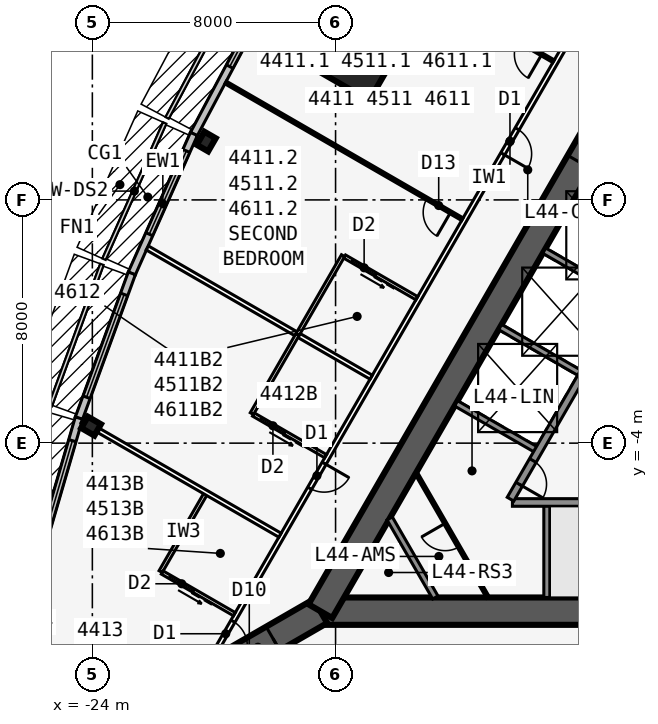
"""IFC4 building model, lengths in metres.
Left out: names, types, materials, properties, quantities, classifications, styles, units other than length and angle.
Written with IfcOpenShell. Run it as: python <this file> out.ifc"""

import sys

from ifc_helpers import new_model, si_unit, direction, frame, frame_2d, origin, origin_2d, place, context, subcontext, project, spatial, rectangle, i_section, extrude, element, fill, save


model = new_model("IFC4")
c1 = context("Model", 3, precision=1e-05, world=origin(), true_north=direction((0.0, 1.0)))
c2 = subcontext(c1, "Body", "Model", "MODEL_VIEW")
j1 = project(units=[si_unit("LENGTHUNIT", "METRE"), si_unit("PLANEANGLEUNIT", "RADIAN")], contexts=[c1])
p1 = place(None, origin())
s1 = spatial("IfcSite", under=j1, at=p1, CompositionType="ELEMENT")
p2 = place(p1, origin())
s2 = spatial("IfcBuilding", under=s1, at=p2, CompositionType="ELEMENT")
p3 = place(p2, frame((0.0, 0.0, 165.7)))
s3 = spatial("IfcBuildingStorey", under=s2, at=p3, CompositionType="ELEMENT", Elevation=165.7)
p4 = place(p3, frame((-16.5, -9.526, 0.0), z_axis=(0.0, 0.0, 1.0), x_axis=(1.0, 0.0, 0.0)))
e1 = element("IfcWall", 1, at=p4, inside=s3, PredefinedType="SHEAR", context=c2, shape_type="SweptSolid", body=[
    extrude(rectangle(XDim=33.0, YDim=0.9, at=frame_2d((16.5, 0.0))), origin(), (0.0, 0.0, 1.0), 3.4),
])
p5 = place(p4, frame((14.05, 0.0, 0.0)))
e2 = element("IfcOpeningElement", 2, at=p5, cuts=e1, PredefinedType="OPENING", context=c2, shape_type="SweptSolid", body=[
    extrude(rectangle(XDim=1.8, YDim=2.13, at=frame_2d((0.9, 1.065))), frame((0.0, 0.46, 0.0), z_axis=(0.0, -1.0, 0.0), x_axis=(1.0, 0.0, 0.0)), (0.0, 0.0, 1.0), 0.92),
])
p6 = place(p3, frame((-10.183, -5.951, 0.0), z_axis=(0.0, 0.0, 1.0), x_axis=(1.0, 0.0, 0.0)))
e3 = element("IfcWall", 3, at=p6, inside=s3, PredefinedType="SOLIDWALL", context=c2, shape_type="SweptSolid", body=[
    extrude(rectangle(XDim=7.633, YDim=0.25, at=frame_2d((3.816, 0.0))), origin(), (0.0, 0.0, 1.0), 3.235),
])
p7 = place(p3, frame((-9.05, -5.951, 0.0), z_axis=(0.0, 0.0, 1.0), x_axis=(0.0, -1.0, 0.0)))
e4 = element("IfcWall", 4, at=p7, inside=s3, PredefinedType="SOLIDWALL", context=c2, shape_type="SweptSolid", body=[
    extrude(rectangle(XDim=3.125, YDim=0.2, at=frame_2d((1.562, 0.0))), origin(), (0.0, 0.0, 1.0), 3.235),
])
p8 = place(p3, frame((0.0, 19.052, 0.0), z_axis=(0.0, 0.0, 1.0), x_axis=(-0.499999749417, -0.866025548458, 0.0)))
e5 = element("IfcWall", 5, at=p8, inside=s3, PredefinedType="SHEAR", context=c2, shape_type="SweptSolid", body=[
    extrude(rectangle(XDim=33.0, YDim=0.9, at=frame_2d((16.5, 0.0))), origin(), (0.0, 0.0, 1.0), 3.4),
])
p9 = place(p8, frame((14.15, 0.0, 0.0)))
e6 = element("IfcOpeningElement", 6, at=p9, cuts=e5, PredefinedType="OPENING", context=c2, shape_type="SweptSolid", body=[
    extrude(rectangle(XDim=1.8, YDim=2.13, at=frame_2d((0.9, 1.065))), frame((0.0, 0.46, 0.0), z_axis=(0.0, -1.0, 0.0), x_axis=(1.0, 0.0, 0.0)), (0.0, 0.0, 1.0), 0.92),
])
p10 = place(p8, frame((12.6, 0.0, 0.0)))
e7 = element("IfcOpeningElement", 7, at=p10, cuts=e5, PredefinedType="OPENING", context=c2, shape_type="SweptSolid", body=[
    extrude(rectangle(XDim=1.0, YDim=2.13, at=frame_2d((0.5, 1.065))), frame((0.0, 0.46, 0.0), z_axis=(0.0, -1.0, 0.0), x_axis=(1.0, 0.0, 0.0)), (0.0, 0.0, 1.0), 0.92),
])
p11 = place(p3, frame((-4.929, 3.365, 0.0), z_axis=(0.0, 0.0, 1.0), x_axis=(-0.499991433582, -0.866030349552, 0.0)))
e8 = element("IfcWall", 8, at=p11, inside=s3, PredefinedType="SOLIDWALL", context=c2, shape_type="SweptSolid", body=[
    extrude(rectangle(XDim=10.633, YDim=0.25, at=frame_2d((5.316, 0.0))), origin(), (0.0, 0.0, 1.0), 3.235),
])
p12 = place(p11, frame((9.164, 0.0, 0.0)))
e9 = element("IfcOpeningElement", 9, at=p12, cuts=e8, PredefinedType="OPENING", context=c2, shape_type="SweptSolid", body=[
    extrude(rectangle(XDim=0.9, YDim=2.13, at=frame_2d((0.45, 1.065))), frame((0.0, 0.135, 0.0), z_axis=(0.0, -1.0, 0.0), x_axis=(1.0, 0.0, 0.0)), (0.0, 0.0, 1.0), 0.27),
])
for number, where, z_axis, x_axis in (
    (10, (-6.429, 0.767, 0.0), (0.0, 0.0, 1.0), (-0.866, 0.5, 0.0)),
    (11, (-7.879, -1.744, 0.0), (0.0, 0.0, 1.0), (-0.866, 0.5, 0.0)),
    (12, (-9.329, -4.256, 0.0), (0.0, 0.0, 1.0), (-0.866, 0.5, 0.0)),
):
    element("IfcWall", number, at=place(p3, frame(where, z_axis=z_axis, x_axis=x_axis)), inside=s3, PredefinedType="SOLIDWALL", context=c2, shape_type="SweptSolid", body=[
        extrude(rectangle(XDim=3.125, YDim=0.2, at=frame_2d((1.562, 0.0))), origin(), (0.0, 0.0, 1.0), 3.235),
    ])
p13 = place(p3, frame((-16.5, -9.526, 0.0), z_axis=(0.0, 0.0, 1.0), x_axis=(-0.866031398331, -0.499989616998, 0.0)))
e13 = element("IfcWall", 13, at=p13, inside=s3, PredefinedType="SHEAR", context=c2, shape_type="SweptSolid", body=[
    extrude(rectangle(XDim=4.746, YDim=0.9, at=frame_2d((2.373, 0.0))), origin(), (0.0, 0.0, 1.0), 3.4),
])
p14 = place(p13, frame((1.8, 0.0, 0.0)))
e14 = element("IfcOpeningElement", 14, at=p14, cuts=e13, PredefinedType="OPENING", context=c2, shape_type="SweptSolid", body=[
    extrude(rectangle(XDim=1.8, YDim=2.13, at=frame_2d((0.9, 1.065))), frame((0.0, 0.46, 0.0), z_axis=(0.0, -1.0, 0.0), x_axis=(1.0, 0.0, 0.0)), (0.0, 0.0, 1.0), 0.92),
])
for number, where, z_axis, x_axis in (
    (15, (-20.254, 5.92, 0.0), (0.0, 0.0, 1.0), (-0.866, 0.5, 0.0)),
    (16, (-24.041, -3.44, 0.0), (0.0, 0.0, 1.0), (-0.5, -0.866, 0.0)),
):
    element("IfcColumn", number, at=place(p3, frame(where, z_axis=z_axis, x_axis=x_axis)), inside=s3, PredefinedType="COLUMN", context=c2, shape_type="SweptSolid", body=[
        extrude(i_section(OverallWidth=0.432, OverallDepth=0.498, WebThickness=0.056, FlangeThickness=0.089, at=origin_2d()), origin(), (0.0, 0.0, 1.0), 3.4),
    ])
p15 = place(p3, frame((-15.312, 8.84, 0.0), z_axis=(0.0, 0.0, 1.0), x_axis=(-0.866025403784, 0.5, 0.0)))
e17 = element("IfcColumn", 17, at=p15, inside=s3, PredefinedType="COLUMN", context=c2, shape_type="SweptSolid", body=[
    extrude(rectangle(XDim=2.3, YDim=2.3, at=origin_2d()), origin(), (0.0, 0.0, 1.0), 3.4),
])
p16 = place(p3, frame((-18.314, 10.579, 0.0), z_axis=(0.0, 0.0, 1.0), x_axis=(-0.469404966864, -0.882982999317, 0.0)))
e18 = element("IfcWall", 18, at=p16, inside=s3, PredefinedType="STANDARD", context=c2, shape_type="SweptSolid", body=[
    extrude(rectangle(XDim=5.003, YDim=0.25, at=frame_2d((2.501, 0.0))), origin(), (0.0, 0.0, 1.0), 3.235),
])
p17 = place(p16, frame((0.684, 0.0, 0.45)))
e19 = element("IfcOpeningElement", 19, at=p17, cuts=e18, PredefinedType="OPENING", context=c2, shape_type="SweptSolid", body=[
    extrude(rectangle(XDim=1.8, YDim=2.4, at=frame_2d((0.9, 1.2))), frame((0.0, 0.135, 0.0), z_axis=(0.0, -1.0, 0.0), x_axis=(1.0, 0.0, 0.0)), (0.0, 0.0, 1.0), 0.27),
])
p18 = place(p3, frame((-20.659, 6.169, 0.0), z_axis=(0.0, 0.0, 1.0), x_axis=(-0.406832200364, -0.913502906808, 0.0)))
e20 = element("IfcWall", 20, at=p18, inside=s3, PredefinedType="STANDARD", context=c2, shape_type="SweptSolid", body=[
    extrude(rectangle(XDim=5.028, YDim=0.25, at=frame_2d((2.514, 0.0))), origin(), (0.0, 0.0, 1.0), 3.235),
])
p19 = place(p18, frame((0.61, 0.0, 0.45)))
e21 = element("IfcOpeningElement", 21, at=p19, cuts=e20, PredefinedType="OPENING", context=c2, shape_type="SweptSolid", body=[
    extrude(rectangle(XDim=3.0, YDim=2.4, at=frame_2d((1.5, 1.2))), frame((0.0, 0.135, 0.0), z_axis=(0.0, -1.0, 0.0), x_axis=(1.0, 0.0, 0.0)), (0.0, 0.0, 1.0), 0.27),
])
p20 = place(p3, frame((-22.701, 1.584, 0.0), z_axis=(0.0, 0.0, 1.0), x_axis=(-0.343225593282, -0.939252996863, 0.0)))
e22 = element("IfcWall", 22, at=p20, inside=s3, PredefinedType="STANDARD", context=c2, shape_type="SweptSolid", body=[
    extrude(rectangle(XDim=5.076, YDim=0.25, at=frame_2d((2.538, 0.0))), origin(), (0.0, 0.0, 1.0), 3.235),
])
p21 = place(p20, frame((0.738, 0.0, 0.45)))
e23 = element("IfcOpeningElement", 23, at=p21, cuts=e22, PredefinedType="OPENING", context=c2, shape_type="SweptSolid", body=[
    extrude(rectangle(XDim=3.6, YDim=2.4, at=frame_2d((1.8, 1.2))), frame((0.0, 0.135, 0.0), z_axis=(0.0, -1.0, 0.0), x_axis=(1.0, 0.0, 0.0)), (0.0, 0.0, 1.0), 0.27),
])
p22 = place(p3, frame((-24.441, -3.175, 0.0), z_axis=(0.0, 0.0, 1.0), x_axis=(-0.279528287117, -0.960137457191, 0.0)))
e24 = element("IfcWall", 24, at=p22, inside=s3, PredefinedType="STANDARD", context=c2, shape_type="SweptSolid", body=[
    extrude(rectangle(XDim=5.148, YDim=0.25, at=frame_2d((2.574, 0.0))), origin(), (0.0, 0.0, 1.0), 3.235),
])
p23 = place(p22, frame((0.774, 0.0, 0.45)))
e25 = element("IfcOpeningElement", 25, at=p23, cuts=e24, PredefinedType="OPENING", context=c2, shape_type="SweptSolid", body=[
    extrude(rectangle(XDim=3.6, YDim=2.4, at=frame_2d((1.8, 1.2))), frame((0.0, 0.135, 0.0), z_axis=(0.0, -1.0, 0.0), x_axis=(1.0, 0.0, 0.0)), (0.0, 0.0, 1.0), 0.27),
])
p24 = place(p3, frame((-0.5, 22.836, 0.0), z_axis=(0.0, 0.0, 1.0), x_axis=(-0.500001677587, -0.866024435227, 0.0)))
e26 = element("IfcWall", 26, at=p24, inside=s3, PredefinedType="PARTITIONING", context=c2, shape_type="SweptSolid", body=[
    extrude(rectangle(XDim=39.054, YDim=0.15, at=frame_2d((19.527, 0.0))), origin(), (0.0, 0.0, 1.0), 3.235),
])
p25 = place(p24, frame((1.558, 0.0, 0.0)))
e27 = element("IfcOpeningElement", 27, at=p25, cuts=e26, PredefinedType="OPENING", context=c2, shape_type="SweptSolid", body=[
    extrude(rectangle(XDim=0.95, YDim=2.13, at=frame_2d((0.475, 1.065))), frame((0.0, 0.085, 0.0), z_axis=(0.0, -1.0, 0.0), x_axis=(1.0, 0.0, 0.0)), (0.0, 0.0, 1.0), 0.17),
])
p26 = place(p24, frame((19.052, 0.0, 0.0)))
e28 = element("IfcOpeningElement", 28, at=p26, cuts=e26, PredefinedType="OPENING", context=c2, shape_type="SweptSolid", body=[
    extrude(rectangle(XDim=0.95, YDim=2.13, at=frame_2d((0.475, 1.065))), frame((0.0, 0.085, 0.0), z_axis=(0.0, -1.0, 0.0), x_axis=(1.0, 0.0, 0.0)), (0.0, 0.0, 1.0), 0.17),
])
p27 = place(p24, frame((31.752, 0.0, 0.0)))
e29 = element("IfcOpeningElement", 29, at=p27, cuts=e26, PredefinedType="OPENING", context=c2, shape_type="SweptSolid", body=[
    extrude(rectangle(XDim=0.95, YDim=2.13, at=frame_2d((0.475, 1.065))), frame((0.0, 0.085, 0.0), z_axis=(0.0, -1.0, 0.0), x_axis=(1.0, 0.0, 0.0)), (0.0, 0.0, 1.0), 0.17),
])
p28 = place(p24, frame((37.752, 0.0, 0.0)))
e30 = element("IfcOpeningElement", 30, at=p28, cuts=e26, PredefinedType="OPENING", context=c2, shape_type="SweptSolid", body=[
    extrude(rectangle(XDim=0.95, YDim=2.13, at=frame_2d((0.475, 1.065))), frame((0.0, 0.085, 0.0), z_axis=(0.0, -1.0, 0.0), x_axis=(1.0, 0.0, 0.0)), (0.0, 0.0, 1.0), 0.17),
])
p29 = place(p3, frame((-8.829, 8.561, 0.0), z_axis=(0.0, 0.0, 1.0), x_axis=(-0.866021034389, 0.500007567939, 0.0)))
e31 = element("IfcWall", 31, at=p29, inside=s3, PredefinedType="PARTITIONING", context=c2, shape_type="SweptSolid", body=[
    extrude(rectangle(XDim=8.993, YDim=0.1, at=frame_2d((4.497, 0.0))), origin(), (0.0, 0.0, 1.0), 3.235),
])
p30 = place(p29, frame((0.45, 0.0, 0.0)))
e32 = element("IfcOpeningElement", 32, at=p30, cuts=e31, PredefinedType="OPENING", context=c2, shape_type="SweptSolid", body=[
    extrude(rectangle(XDim=0.9, YDim=2.13, at=frame_2d((0.45, 1.065))), frame((0.0, 0.06, 0.0), z_axis=(0.0, -1.0, 0.0), x_axis=(1.0, 0.0, 0.0)), (0.0, 0.0, 1.0), 0.12),
])
p31 = place(p3, frame((-11.829, 3.365, 0.0), z_axis=(0.0, 0.0, 1.0), x_axis=(-0.866009279501, 0.500027927039, 0.0)))
e33 = element("IfcWall", 33, at=p31, inside=s3, PredefinedType="PARTITIONING", context=c2, shape_type="SweptSolid", body=[
    extrude(rectangle(XDim=8.994, YDim=0.1, at=frame_2d((4.497, 0.0))), origin(), (0.0, 0.0, 1.0), 3.235),
])
p32 = place(p31, frame((0.45, 0.0, 0.0)))
e34 = element("IfcOpeningElement", 34, at=p32, cuts=e33, PredefinedType="OPENING", context=c2, shape_type="SweptSolid", body=[
    extrude(rectangle(XDim=0.9, YDim=2.13, at=frame_2d((0.45, 1.065))), frame((0.0, 0.06, 0.0), z_axis=(0.0, -1.0, 0.0), x_axis=(1.0, 0.0, 0.0)), (0.0, 0.0, 1.0), 0.12),
])
p33 = place(p3, frame((-14.829, -1.831, 0.0), z_axis=(0.0, 0.0, 1.0), x_axis=(-0.866023962952, 0.500002495586, 0.0)))
e35 = element("IfcWall", 35, at=p33, inside=s3, PredefinedType="PARTITIONING", context=c2, shape_type="SweptSolid", body=[
    extrude(rectangle(XDim=8.502, YDim=0.15, at=frame_2d((4.251, 0.0))), origin(), (0.0, 0.0, 1.0), 3.235),
])
p34 = place(p3, frame((-17.829, -7.027, 0.0), z_axis=(0.0, 0.0, 1.0), x_axis=(-0.866029804378, 0.499992377871, 0.0)))
e36 = element("IfcWall", 36, at=p34, inside=s3, PredefinedType="PARTITIONING", context=c2, shape_type="SweptSolid", body=[
    extrude(rectangle(XDim=7.516, YDim=0.15, at=frame_2d((3.758, 0.0))), origin(), (0.0, 0.0, 1.0), 2.389),
])
p35 = place(p3, frame((-15.753, 2.167, 0.0), z_axis=(0.0, 0.0, 1.0), x_axis=(-0.499990139034, -0.866031096941, 0.0)))
e37 = element("IfcWall", 37, at=p35, inside=s3, PredefinedType="PLUMBINGWALL", context=c2, shape_type="SweptSolid", body=[
    extrude(rectangle(XDim=3.0, YDim=0.12, at=frame_2d((1.5, 0.0))), origin(), (0.0, 0.0, 1.0), 3.235),
])
p36 = place(p3, frame((-13.329, 0.767, 0.0), z_axis=(0.0, 0.0, 1.0), x_axis=(-0.866035715982, 0.499982138324, 0.0)))
e38 = element("IfcWall", 38, at=p36, inside=s3, PredefinedType="PLUMBINGWALL", context=c2, shape_type="SweptSolid", body=[
    extrude(rectangle(XDim=2.74, YDim=0.12, at=frame_2d((1.37, 0.0))), origin(), (0.0, 0.0, 1.0), 3.235),
])
p37 = place(p36, frame((1.55, 0.0, 0.0)))
e39 = element("IfcOpeningElement", 39, at=p37, cuts=e38, PredefinedType="OPENING", context=c2, shape_type="SweptSolid", body=[
    extrude(rectangle(XDim=0.9, YDim=2.13, at=frame_2d((0.45, 1.065))), frame((0.0, 0.07, 0.0), z_axis=(0.0, -1.0, 0.0), x_axis=(1.0, 0.0, 0.0)), (0.0, 0.0, 1.0), 0.14),
])
p38 = place(p3, frame((-17.253, -0.431, 0.0), z_axis=(0.0, 0.0, 1.0), x_axis=(-0.499990139034, -0.866031096941, 0.0)))
e40 = element("IfcWall", 40, at=p38, inside=s3, PredefinedType="PLUMBINGWALL", context=c2, shape_type="SweptSolid", body=[
    extrude(rectangle(XDim=3.0, YDim=0.12, at=frame_2d((1.5, 0.0))), origin(), (0.0, 0.0, 1.0), 3.235),
])
p39 = place(p3, frame((-16.329, -4.429, 0.0), z_axis=(0.0, 0.0, 1.0), x_axis=(-0.865997131366, 0.500048966069, 0.0)))
e41 = element("IfcWall", 41, at=p39, inside=s3, PredefinedType="PLUMBINGWALL", context=c2, shape_type="SweptSolid", body=[
    extrude(rectangle(XDim=2.74, YDim=0.12, at=frame_2d((1.37, 0.0))), origin(), (0.0, 0.0, 1.0), 3.235),
])
p40 = place(p39, frame((1.55, 0.0, 0.0)))
e42 = element("IfcOpeningElement", 42, at=p40, cuts=e41, PredefinedType="OPENING", context=c2, shape_type="SweptSolid", body=[
    extrude(rectangle(XDim=0.9, YDim=2.13, at=frame_2d((0.45, 1.065))), frame((0.0, 0.07, 0.0), z_axis=(0.0, -1.0, 0.0), x_axis=(1.0, 0.0, 0.0)), (0.0, 0.0, 1.0), 0.14),
])
p41 = place(p3, frame((-20.253, -5.627, 0.0), z_axis=(0.0, 0.0, 1.0), x_axis=(-0.499990139034, -0.866031096941, 0.0)))
e43 = element("IfcWall", 43, at=p41, inside=s3, PredefinedType="PLUMBINGWALL", context=c2, shape_type="SweptSolid", body=[
    extrude(rectangle(XDim=3.0, YDim=0.12, at=frame_2d((1.5, 0.0))), origin(), (0.0, 0.0, 1.0), 3.235),
])
p42 = place(p3, frame((-19.329, -9.625, 0.0), z_axis=(0.0, 0.0, 1.0), x_axis=(-0.866035715982, 0.499982138324, 0.0)))
e44 = element("IfcWall", 44, at=p42, inside=s3, PredefinedType="PLUMBINGWALL", context=c2, shape_type="SweptSolid", body=[
    extrude(rectangle(XDim=2.74, YDim=0.12, at=frame_2d((1.37, 0.0))), origin(), (0.0, 0.0, 1.0), 3.235),
])
p43 = place(p42, frame((1.55, 0.0, 0.0)))
e45 = element("IfcOpeningElement", 45, at=p43, cuts=e44, PredefinedType="OPENING", context=c2, shape_type="SweptSolid", body=[
    extrude(rectangle(XDim=0.9, YDim=2.13, at=frame_2d((0.45, 1.065))), frame((0.0, 0.07, 0.0), z_axis=(0.0, -1.0, 0.0), x_axis=(1.0, 0.0, 0.0)), (0.0, 0.0, 1.0), 0.14),
])
p44 = place(p3, frame((-12.719, -9.076, 0.0), z_axis=(0.0, 0.0, 1.0), x_axis=(-0.499952404951, 0.866052881055, 0.0)))
e46 = element("IfcWall", 46, at=p44, inside=s3, PredefinedType="SOLIDWALL", context=c2, shape_type="SweptSolid", body=[
    extrude(rectangle(XDim=3.002, YDim=0.2, at=frame_2d((1.501, 0.0))), origin(), (0.0, 0.0, 1.0), 3.235),
])
p45 = place(p3, frame((-10.986, -9.076, 0.0), z_axis=(0.0, 0.0, 1.0), x_axis=(-0.499999210213, 0.866025859768, 0.0)))
e47 = element("IfcWall", 47, at=p45, inside=s3, PredefinedType="PARTITIONING", context=c2, shape_type="SweptSolid", body=[
    extrude(rectangle(XDim=4.734, YDim=0.1, at=frame_2d((2.367, 0.0))), origin(), (0.0, 0.0, 1.0), 3.235),
])
p46 = place(p45, frame((1.917, 0.0, 0.0)))
e48 = element("IfcOpeningElement", 48, at=p46, cuts=e47, PredefinedType="OPENING", context=c2, shape_type="SweptSolid", body=[
    extrude(rectangle(XDim=0.9, YDim=2.13, at=frame_2d((0.45, 1.065))), frame((0.0, 0.06, 0.0), z_axis=(0.0, -1.0, 0.0), x_axis=(1.0, 0.0, 0.0)), (0.0, 0.0, 1.0), 0.12),
])
p47 = place(p17, origin())
e49 = element("IfcWindow", 49, at=p47, inside=s3, PartitioningType="SINGLE_PANEL", PredefinedType="WINDOW", context=c2, shape_type="SweptSolid", body=[
    extrude(rectangle(XDim=1.8, YDim=2.4, at=frame_2d((0.9, 1.2))), frame((0.0, 0.03, 0.0), z_axis=(0.0, -1.0, 0.0), x_axis=(1.0, 0.0, 0.0)), (0.0, 0.0, 1.0), 0.06),
])
fill(e19, e49)
p48 = place(p19, origin())
e50 = element("IfcWindow", 50, at=p48, inside=s3, PartitioningType="SINGLE_PANEL", PredefinedType="WINDOW", context=c2, shape_type="SweptSolid", body=[
    extrude(rectangle(XDim=3.0, YDim=2.4, at=frame_2d((1.5, 1.2))), frame((0.0, 0.03, 0.0), z_axis=(0.0, -1.0, 0.0), x_axis=(1.0, 0.0, 0.0)), (0.0, 0.0, 1.0), 0.06),
])
fill(e21, e50)
p49 = place(p21, origin())
e51 = element("IfcWindow", 51, at=p49, inside=s3, PartitioningType="SINGLE_PANEL", PredefinedType="WINDOW", context=c2, shape_type="SweptSolid", body=[
    extrude(rectangle(XDim=3.6, YDim=2.4, at=frame_2d((1.8, 1.2))), frame((0.0, 0.03, 0.0), z_axis=(0.0, -1.0, 0.0), x_axis=(1.0, 0.0, 0.0)), (0.0, 0.0, 1.0), 0.06),
])
fill(e23, e51)
p50 = place(p23, origin())
e52 = element("IfcWindow", 52, at=p50, inside=s3, PartitioningType="SINGLE_PANEL", PredefinedType="WINDOW", context=c2, shape_type="SweptSolid", body=[
    extrude(rectangle(XDim=3.6, YDim=2.4, at=frame_2d((1.8, 1.2))), frame((0.0, 0.03, 0.0), z_axis=(0.0, -1.0, 0.0), x_axis=(1.0, 0.0, 0.0)), (0.0, 0.0, 1.0), 0.06),
])
fill(e25, e52)
p51 = place(p30, origin())
e53 = element("IfcDoor", 53, at=p51, inside=s3, OperationType="SINGLE_SWING_LEFT", PredefinedType="DOOR", context=c2, shape_type="SweptSolid", body=[
    extrude(rectangle(XDim=0.9, YDim=2.13, at=frame_2d((0.45, 1.065))), frame((0.0, 0.025, 0.0), z_axis=(0.0, -1.0, 0.0), x_axis=(1.0, 0.0, 0.0)), (0.0, 0.0, 1.0), 0.05),
])
fill(e32, e53)
p52 = place(p32, origin())
e54 = element("IfcDoor", 54, at=p52, inside=s3, OperationType="SINGLE_SWING_LEFT", PredefinedType="DOOR", context=c2, shape_type="SweptSolid", body=[
    extrude(rectangle(XDim=0.9, YDim=2.13, at=frame_2d((0.45, 1.065))), frame((0.0, 0.025, 0.0), z_axis=(0.0, -1.0, 0.0), x_axis=(1.0, 0.0, 0.0)), (0.0, 0.0, 1.0), 0.05),
])
fill(e34, e54)
p53 = place(p26, origin())
e55 = element("IfcDoor", 55, at=p53, inside=s3, OperationType="SINGLE_SWING_RIGHT", PredefinedType="DOOR", context=c2, shape_type="SweptSolid", body=[
    extrude(rectangle(XDim=0.95, YDim=2.13, at=frame_2d((0.475, 1.065))), frame((0.0, 0.025, 0.0), z_axis=(0.0, -1.0, 0.0), x_axis=(1.0, 0.0, 0.0)), (0.0, 0.0, 1.0), 0.05),
])
fill(e28, e55)
p54 = place(p37, origin())
e56 = element("IfcDoor", 56, at=p54, inside=s3, OperationType="SLIDING_TO_LEFT", PredefinedType="DOOR", context=c2, shape_type="SweptSolid", body=[
    extrude(rectangle(XDim=0.9, YDim=2.13, at=frame_2d((0.45, 1.065))), frame((0.0, 0.025, 0.0), z_axis=(0.0, -1.0, 0.0), x_axis=(1.0, 0.0, 0.0)), (0.0, 0.0, 1.0), 0.05),
])
fill(e39, e56)
p55 = place(p40, origin())
e57 = element("IfcDoor", 57, at=p55, inside=s3, OperationType="SLIDING_TO_LEFT", PredefinedType="DOOR", context=c2, shape_type="SweptSolid", body=[
    extrude(rectangle(XDim=0.9, YDim=2.13, at=frame_2d((0.45, 1.065))), frame((0.0, 0.025, 0.0), z_axis=(0.0, -1.0, 0.0), x_axis=(1.0, 0.0, 0.0)), (0.0, 0.0, 1.0), 0.05),
])
fill(e42, e57)
p56 = place(p27, origin())
e58 = element("IfcDoor", 58, at=p56, inside=s3, OperationType="SINGLE_SWING_LEFT", PredefinedType="DOOR", context=c2, shape_type="SweptSolid", body=[
    extrude(rectangle(XDim=0.95, YDim=2.13, at=frame_2d((0.475, 1.065))), frame((0.0, 0.025, 0.0), z_axis=(0.0, -1.0, 0.0), x_axis=(1.0, 0.0, 0.0)), (0.0, 0.0, 1.0), 0.05),
])
fill(e29, e58)
p57 = place(p43, origin())
e59 = element("IfcDoor", 59, at=p57, inside=s3, OperationType="SLIDING_TO_LEFT", PredefinedType="DOOR", context=c2, shape_type="SweptSolid", body=[
    extrude(rectangle(XDim=0.9, YDim=2.13, at=frame_2d((0.45, 1.065))), frame((0.0, 0.025, 0.0), z_axis=(0.0, -1.0, 0.0), x_axis=(1.0, 0.0, 0.0)), (0.0, 0.0, 1.0), 0.05),
])
fill(e45, e59)
p58 = place(p28, origin())
e60 = element("IfcDoor", 60, at=p58, inside=s3, OperationType="SINGLE_SWING_RIGHT", PredefinedType="DOOR", context=c2, shape_type="SweptSolid", body=[
    extrude(rectangle(XDim=0.95, YDim=2.13, at=frame_2d((0.475, 1.065))), frame((0.0, 0.025, 0.0), z_axis=(0.0, -1.0, 0.0), x_axis=(1.0, 0.0, 0.0)), (0.0, 0.0, 1.0), 0.05),
])
fill(e30, e60)
p59 = place(p14, origin())
e61 = element("IfcDoor", 61, at=p59, inside=s3, OperationType="DOUBLE_DOOR_DOUBLE_SWING", PredefinedType="DOOR", context=c2, shape_type="SweptSolid", body=[
    extrude(rectangle(XDim=1.8, YDim=2.13, at=frame_2d((0.9, 1.065))), frame((0.0, 0.025, 0.0), z_axis=(0.0, -1.0, 0.0), x_axis=(1.0, 0.0, 0.0)), (0.0, 0.0, 1.0), 0.05),
])
fill(e14, e61)
p60 = place(p46, origin())
e62 = element("IfcDoor", 62, at=p60, inside=s3, OperationType="SINGLE_SWING_RIGHT", PredefinedType="DOOR", context=c2, shape_type="SweptSolid", body=[
    extrude(rectangle(XDim=0.9, YDim=2.13, at=frame_2d((0.45, 1.065))), frame((0.0, 0.025, 0.0), z_axis=(0.0, -1.0, 0.0), x_axis=(1.0, 0.0, 0.0)), (0.0, 0.0, 1.0), 0.05),
])
fill(e48, e62)
p61 = place(p12, origin())
e63 = element("IfcDoor", 63, at=p61, inside=s3, OperationType="SINGLE_SWING_RIGHT", PredefinedType="DOOR", context=c2, shape_type="SweptSolid", body=[
    extrude(rectangle(XDim=0.9, YDim=2.13, at=frame_2d((0.45, 1.065))), frame((0.0, 0.025, 0.0), z_axis=(0.0, -1.0, 0.0), x_axis=(1.0, 0.0, 0.0)), (0.0, 0.0, 1.0), 0.05),
])
fill(e9, e63)
save(model, sys.argv[1])
